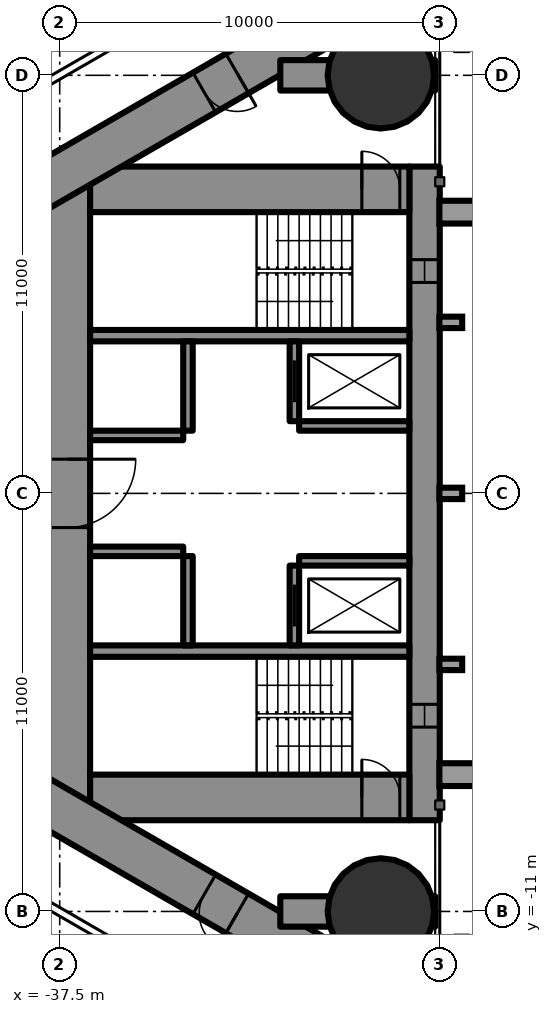
"""IFC4 building model, lengths in metres.
Left out: names, types, materials, properties, quantities, classifications, styles, units other than length and angle.
Written with IfcOpenShell. Run it as: python <this file> out.ifc"""

import sys

from ifc_helpers import new_model, si_unit, direction, frame, frame_2d, origin, origin_2d, place, context, subcontext, project, spatial, rectangle, circle, extrude, element, fill, save


model = new_model("IFC4")
c1 = context("Model", 3, precision=1e-05, world=origin(), true_north=direction((0.0, 1.0)))
c2 = subcontext(c1, "Body", "Model", "MODEL_VIEW")
j1 = project(units=[si_unit("LENGTHUNIT", "METRE"), si_unit("PLANEANGLEUNIT", "RADIAN")], contexts=[c1])
p1 = place(None, origin())
s1 = spatial("IfcSite", under=j1, at=p1, CompositionType="ELEMENT")
p2 = place(p1, origin())
s2 = spatial("IfcBuilding", under=s1, at=p2, CompositionType="ELEMENT")
p3 = place(p2, frame((0.0, 0.0, 201.8)))
s3 = spatial("IfcBuildingStorey", under=s2, at=p3, CompositionType="ELEMENT", Elevation=201.8)
for number, where, z_axis, x_axis in (
    (1, (-29.05, -11.0, 0.0), (0.0, 0.0, 1.0), (1.0, 0.0, 0.0)),
    (2, (-29.05, 11.0, 0.0), (0.0, 0.0, 1.0), (1.0, 0.0, 0.0)),
):
    element("IfcColumn", number, at=place(p3, frame(where, z_axis=z_axis, x_axis=x_axis)), inside=s3, PredefinedType="COLUMN", context=c2, shape_type="SweptSolid", body=[
        extrude(circle(Radius=1.4, at=origin_2d()), origin(), (0.0, 0.0, 1.0), 3.5),
    ])
p4 = place(p3, frame((-27.9, 8.6, 0.0), z_axis=(0.0, 0.0, 1.0), x_axis=(0.0, -1.0, 0.0)))
e3 = element("IfcWall", 3, at=p4, inside=s3, PredefinedType="SHEAR", context=c2, shape_type="SweptSolid", body=[
    extrude(rectangle(XDim=17.2, YDim=0.8, at=frame_2d((8.6, 0.0))), origin(), (0.0, 0.0, 1.0), 3.5),
])
p5 = place(p4, frame((2.45, 0.0, 0.6)))
e4 = element("IfcOpeningElement", 4, at=p5, cuts=e3, PredefinedType="OPENING", context=c2, shape_type="SweptSolid", body=[
    extrude(rectangle(XDim=0.6, YDim=2.1, at=frame_2d((0.3, 1.05))), frame((0.0, 0.41, 0.0), z_axis=(0.0, -1.0, 0.0), x_axis=(1.0, 0.0, 0.0)), (0.0, 0.0, 1.0), 0.82),
])
p6 = place(p4, frame((14.15, 0.0, 0.6)))
e5 = element("IfcOpeningElement", 5, at=p6, cuts=e3, PredefinedType="OPENING", context=c2, shape_type="SweptSolid", body=[
    extrude(rectangle(XDim=0.6, YDim=2.1, at=frame_2d((0.3, 1.05))), frame((0.0, 0.41, 0.0), z_axis=(0.0, -1.0, 0.0), x_axis=(1.0, 0.0, 0.0)), (0.0, 0.0, 1.0), 0.82),
])
p7 = place(p3, frame((-37.3, 8.6, 0.0), z_axis=(0.0, 0.0, 1.0), x_axis=(0.0, -1.0, 0.0)))
e6 = element("IfcWall", 6, at=p7, inside=s3, PredefinedType="SHEAR", context=c2, shape_type="SweptSolid", body=[
    extrude(rectangle(XDim=17.2, YDim=1.2, at=frame_2d((8.6, 0.0))), origin(), (0.0, 0.0, 1.0), 3.5),
])
p8 = place(p7, frame((7.7, 0.0, 0.0)))
e7 = element("IfcOpeningElement", 7, at=p8, cuts=e6, PredefinedType="OPENING", context=c2, shape_type="SweptSolid", body=[
    extrude(rectangle(XDim=1.8, YDim=2.2, at=frame_2d((0.9, 1.1))), frame((0.0, 0.61, 0.0), z_axis=(0.0, -1.0, 0.0), x_axis=(1.0, 0.0, 0.0)), (0.0, 0.0, 1.0), 1.22),
])
p9 = place(p3, frame((-28.3, 8.0, 0.0), z_axis=(0.0, 0.0, 1.0), x_axis=(-1.0, 0.0, 0.0)))
e8 = element("IfcWall", 8, at=p9, inside=s3, PredefinedType="SHEAR", context=c2, shape_type="SweptSolid", body=[
    extrude(rectangle(XDim=8.4, YDim=1.2, at=frame_2d((4.2, 0.0))), origin(), (0.0, 0.0, 1.0), 3.5),
])
p10 = place(p9, frame((0.25, 0.0, 0.0)))
e9 = element("IfcOpeningElement", 9, at=p10, cuts=e8, PredefinedType="OPENING", context=c2, shape_type="SweptSolid", body=[
    extrude(rectangle(XDim=1.0, YDim=2.2, at=frame_2d((0.5, 1.1))), frame((0.0, 0.61, 0.0), z_axis=(0.0, -1.0, 0.0), x_axis=(1.0, 0.0, 0.0)), (0.0, 0.0, 1.0), 1.22),
])
p11 = place(p3, frame((-28.3, -8.0, 0.0), z_axis=(0.0, 0.0, 1.0), x_axis=(-1.0, 0.0, 0.0)))
e10 = element("IfcWall", 10, at=p11, inside=s3, PredefinedType="SHEAR", context=c2, shape_type="SweptSolid", body=[
    extrude(rectangle(XDim=8.4, YDim=1.2, at=frame_2d((4.2, 0.0))), origin(), (0.0, 0.0, 1.0), 3.5),
])
p12 = place(p11, frame((0.25, 0.0, 0.0)))
e11 = element("IfcOpeningElement", 11, at=p12, cuts=e10, PredefinedType="OPENING", context=c2, shape_type="SweptSolid", body=[
    extrude(rectangle(XDim=1.0, YDim=2.2, at=frame_2d((0.5, 1.1))), frame((0.0, 0.61, 0.0), z_axis=(0.0, -1.0, 0.0), x_axis=(1.0, 0.0, 0.0)), (0.0, 0.0, 1.0), 1.22),
])
for number, where, z_axis, x_axis in (
    (12, (-28.3, 4.15, 0.0), (0.0, 0.0, 1.0), (-1.0, 0.0, 0.0)),
    (13, (-28.3, -4.15, 0.0), (0.0, 0.0, 1.0), (-1.0, 0.0, 0.0)),
):
    element("IfcWall", number, at=place(p3, frame(where, z_axis=z_axis, x_axis=x_axis)), inside=s3, PredefinedType="SHEAR", context=c2, shape_type="SweptSolid", body=[
        extrude(rectangle(XDim=8.4, YDim=0.3, at=frame_2d((4.2, 0.0))), origin(), (0.0, 0.0, 1.0), 3.5),
    ])
p13 = place(p3, frame((-31.325, 4.0, 0.0), z_axis=(0.0, 0.0, 1.0), x_axis=(0.0, -1.0, 0.0)))
e14 = element("IfcWall", 14, at=p13, inside=s3, PredefinedType="SHEAR", context=c2, shape_type="SweptSolid", body=[
    extrude(rectangle(XDim=2.1, YDim=0.25, at=frame_2d((1.05, 0.0))), origin(), (0.0, 0.0, 1.0), 3.5),
])
p14 = place(p13, frame((0.5, 0.0, 0.0)))
e15 = element("IfcOpeningElement", 15, at=p14, cuts=e14, PredefinedType="OPENING", context=c2, shape_type="SweptSolid", body=[
    extrude(rectangle(XDim=1.1, YDim=2.2, at=frame_2d((0.55, 1.1))), frame((0.0, 0.135, 0.0), z_axis=(0.0, -1.0, 0.0), x_axis=(1.0, 0.0, 0.0)), (0.0, 0.0, 1.0), 0.27),
])
p15 = place(p3, frame((-34.125, 4.0, 0.0), z_axis=(0.0, 0.0, 1.0), x_axis=(0.0, -1.0, 0.0)))
e16 = element("IfcWall", 16, at=p15, inside=s3, PredefinedType="SHEAR", context=c2, shape_type="SweptSolid", body=[
    extrude(rectangle(XDim=2.35, YDim=0.25, at=frame_2d((1.175, 0.0))), origin(), (0.0, 0.0, 1.0), 3.5),
])
p16 = place(p3, frame((-28.3, 1.775, 0.0), z_axis=(0.0, 0.0, 1.0), x_axis=(-1.0, 0.0, 0.0)))
e17 = element("IfcWall", 17, at=p16, inside=s3, PredefinedType="SHEAR", context=c2, shape_type="SweptSolid", body=[
    extrude(rectangle(XDim=2.9, YDim=0.25, at=frame_2d((1.45, 0.0))), origin(), (0.0, 0.0, 1.0), 3.5),
])
p17 = place(p3, frame((-34.25, 1.525, 0.0), z_axis=(0.0, 0.0, 1.0), x_axis=(-1.0, 0.0, 0.0)))
e18 = element("IfcWall", 18, at=p17, inside=s3, PredefinedType="SHEAR", context=c2, shape_type="SweptSolid", body=[
    extrude(rectangle(XDim=2.45, YDim=0.25, at=frame_2d((1.225, 0.0))), origin(), (0.0, 0.0, 1.0), 3.5),
])
p18 = place(p3, frame((-31.325, -1.9, 0.0), z_axis=(0.0, 0.0, 1.0), x_axis=(0.0, -1.0, 0.0)))
e19 = element("IfcWall", 19, at=p18, inside=s3, PredefinedType="SHEAR", context=c2, shape_type="SweptSolid", body=[
    extrude(rectangle(XDim=2.1, YDim=0.25, at=frame_2d((1.05, 0.0))), origin(), (0.0, 0.0, 1.0), 3.5),
])
p19 = place(p18, frame((0.5, 0.0, 0.0)))
e20 = element("IfcOpeningElement", 20, at=p19, cuts=e19, PredefinedType="OPENING", context=c2, shape_type="SweptSolid", body=[
    extrude(rectangle(XDim=1.1, YDim=2.2, at=frame_2d((0.55, 1.1))), frame((0.0, 0.135, 0.0), z_axis=(0.0, -1.0, 0.0), x_axis=(1.0, 0.0, 0.0)), (0.0, 0.0, 1.0), 0.27),
])
p20 = place(p3, frame((-34.125, -1.65, 0.0), z_axis=(0.0, 0.0, 1.0), x_axis=(0.0, -1.0, 0.0)))
e21 = element("IfcWall", 21, at=p20, inside=s3, PredefinedType="SHEAR", context=c2, shape_type="SweptSolid", body=[
    extrude(rectangle(XDim=2.35, YDim=0.25, at=frame_2d((1.175, 0.0))), origin(), (0.0, 0.0, 1.0), 3.5),
])
p21 = place(p3, frame((-28.3, -1.775, 0.0), z_axis=(0.0, 0.0, 1.0), x_axis=(-1.0, 0.0, 0.0)))
e22 = element("IfcWall", 22, at=p21, inside=s3, PredefinedType="SHEAR", context=c2, shape_type="SweptSolid", body=[
    extrude(rectangle(XDim=2.9, YDim=0.25, at=frame_2d((1.45, 0.0))), origin(), (0.0, 0.0, 1.0), 3.5),
])
p22 = place(p3, frame((-34.25, -1.525, 0.0), z_axis=(0.0, 0.0, 1.0), x_axis=(-1.0, 0.0, 0.0)))
e23 = element("IfcWall", 23, at=p22, inside=s3, PredefinedType="SHEAR", context=c2, shape_type="SweptSolid", body=[
    extrude(rectangle(XDim=2.45, YDim=0.25, at=frame_2d((1.225, 0.0))), origin(), (0.0, 0.0, 1.0), 3.5),
])
p23 = place(p3, frame((-27.2, 14.3, 0.0), z_axis=(0.0, 0.0, 1.0), x_axis=(-0.866026593062, -0.499997940104, 0.0)))
e24 = element("IfcWall", 24, at=p23, inside=s3, PredefinedType="SHEAR", context=c2, shape_type="SweptSolid", body=[
    extrude(rectangle(XDim=28.946, YDim=1.2, at=frame_2d((14.473, 0.0))), origin(), (0.0, 0.0, 1.0), 3.5),
])
p24 = place(p23, frame((6.5, 0.0, 0.0)))
e25 = element("IfcOpeningElement", 25, at=p24, cuts=e24, PredefinedType="OPENING", context=c2, shape_type="SweptSolid", body=[
    extrude(rectangle(XDim=1.0, YDim=2.2, at=frame_2d((0.5, 1.1))), frame((0.0, 0.61, 0.0), z_axis=(0.0, -1.0, 0.0), x_axis=(1.0, 0.0, 0.0)), (0.0, 0.0, 1.0), 1.22),
])
p25 = place(p23, frame((13.395, 0.0, 0.0)))
e26 = element("IfcOpeningElement", 26, at=p25, cuts=e24, PredefinedType="OPENING", context=c2, shape_type="SweptSolid", body=[
    extrude(rectangle(XDim=1.8, YDim=2.03, at=frame_2d((0.9, 1.015))), frame((0.0, 0.61, 0.0), z_axis=(0.0, -1.0, 0.0), x_axis=(1.0, 0.0, 0.0)), (0.0, 0.0, 1.0), 1.22),
])
p26 = place(p3, frame((-27.2, -14.3, 0.0), z_axis=(0.0, 0.0, 1.0), x_axis=(-0.866024021859, 0.500002393557, 0.0)))
e27 = element("IfcWall", 27, at=p26, inside=s3, PredefinedType="SHEAR", context=c2, shape_type="SweptSolid", body=[
    extrude(rectangle(XDim=27.907, YDim=1.2, at=frame_2d((13.954, 0.0))), origin(), (0.0, 0.0, 1.0), 3.5),
])
p27 = place(p26, frame((6.5, 0.0, 0.0)))
e28 = element("IfcOpeningElement", 28, at=p27, cuts=e27, PredefinedType="OPENING", context=c2, shape_type="SweptSolid", body=[
    extrude(rectangle(XDim=1.0, YDim=2.2, at=frame_2d((0.5, 1.1))), frame((0.0, 0.61, 0.0), z_axis=(0.0, -1.0, 0.0), x_axis=(1.0, 0.0, 0.0)), (0.0, 0.0, 1.0), 1.22),
])
p28 = place(p26, frame((13.829, 0.0, 0.0)))
e29 = element("IfcOpeningElement", 29, at=p28, cuts=e27, PredefinedType="OPENING", context=c2, shape_type="SweptSolid", body=[
    extrude(rectangle(XDim=1.8, YDim=2.2, at=frame_2d((0.9, 1.1))), frame((0.0, 0.61, 0.0), z_axis=(0.0, -1.0, 0.0), x_axis=(1.0, 0.0, 0.0)), (0.0, 0.0, 1.0), 1.22),
])
for number, where, z_axis, x_axis in (
    (30, (-27.62, -11.0, 0.0), (0.0, 0.0, 1.0), (-1.0, 0.0, 0.0)),
    (31, (-27.62, 11.0, 0.0), (0.0, 0.0, 1.0), (-1.0, 0.0, 0.0)),
):
    element("IfcWall", number, at=place(p3, frame(where, z_axis=z_axis, x_axis=x_axis)), inside=s3, PredefinedType="SHEAR", context=c2, shape_type="SweptSolid", body=[
        extrude(rectangle(XDim=4.076, YDim=0.8, at=frame_2d((2.038, 0.0))), origin(), (0.0, 0.0, 1.0), 3.5),
    ])
p29 = place(p3, frame((-27.803, 16.608, 0.0), z_axis=(0.0, 0.0, 1.0), x_axis=(-0.866025851808, -0.499999223999, 0.0)))
e32 = element("IfcWall", 32, at=p29, inside=s3, PredefinedType="PARTITIONING", context=c2, shape_type="SweptSolid", body=[
    extrude(rectangle(XDim=33.215, YDim=0.2, at=frame_2d((16.608, 0.0))), origin(), (0.0, 0.0, 1.0), 3.25),
])
p30 = place(p29, frame((5.584, 0.0, 0.0)))
e33 = element("IfcOpeningElement", 33, at=p30, cuts=e32, PredefinedType="OPENING", context=c2, shape_type="SweptSolid", body=[
    extrude(rectangle(XDim=2.0, YDim=2.4, at=frame_2d((1.0, 1.2))), frame((0.0, 0.11, 0.0), z_axis=(0.0, -1.0, 0.0), x_axis=(1.0, 0.0, 0.0)), (0.0, 0.0, 1.0), 0.22),
])
p31 = place(p29, frame((17.04, 0.0, 0.0)))
e34 = element("IfcOpeningElement", 34, at=p31, cuts=e32, PredefinedType="OPENING", context=c2, shape_type="SweptSolid", body=[
    extrude(rectangle(XDim=2.0, YDim=2.4, at=frame_2d((1.0, 1.2))), frame((0.0, 0.11, 0.0), z_axis=(0.0, -1.0, 0.0), x_axis=(1.0, 0.0, 0.0)), (0.0, 0.0, 1.0), 0.22),
])
p32 = place(p29, frame((24.735, 0.0, 0.0)))
e35 = element("IfcOpeningElement", 35, at=p32, cuts=e32, PredefinedType="OPENING", context=c2, shape_type="SweptSolid", body=[
    extrude(rectangle(XDim=2.0, YDim=2.4, at=frame_2d((1.0, 1.2))), frame((0.0, 0.11, 0.0), z_axis=(0.0, -1.0, 0.0), x_axis=(1.0, 0.0, 0.0)), (0.0, 0.0, 1.0), 0.22),
])
p33 = place(p29, frame((30.361, 0.0, 0.0)))
e36 = element("IfcOpeningElement", 36, at=p33, cuts=e32, PredefinedType="OPENING", context=c2, shape_type="SweptSolid", body=[
    extrude(rectangle(XDim=2.0, YDim=2.03, at=frame_2d((1.0, 1.015))), frame((0.0, 0.11, 0.0), z_axis=(0.0, -1.0, 0.0), x_axis=(1.0, 0.0, 0.0)), (0.0, 0.0, 1.0), 0.22),
])
p34 = place(p3, frame((-27.803, -16.608, 0.0), z_axis=(0.0, 0.0, 1.0), x_axis=(-0.866028577512, 0.499994502903, 0.0)))
e37 = element("IfcWall", 37, at=p34, inside=s3, PredefinedType="PARTITIONING", context=c2, shape_type="SweptSolid", body=[
    extrude(rectangle(XDim=12.688, YDim=0.2, at=frame_2d((6.344, 0.0))), origin(), (0.0, 0.0, 1.0), 3.25),
])
p35 = place(p34, frame((5.194, 0.0, 0.0)))
e38 = element("IfcOpeningElement", 38, at=p35, cuts=e37, PredefinedType="OPENING", context=c2, shape_type="SweptSolid", body=[
    extrude(rectangle(XDim=2.0, YDim=2.4, at=frame_2d((1.0, 1.2))), frame((0.0, 0.11, 0.0), z_axis=(0.0, -1.0, 0.0), x_axis=(1.0, 0.0, 0.0)), (0.0, 0.0, 1.0), 0.22),
])
p36 = place(p24, origin())
e39 = element("IfcDoor", 39, at=p36, inside=s3, OperationType="SINGLE_SWING_LEFT", PredefinedType="DOOR", context=c2, shape_type="SweptSolid", body=[
    extrude(rectangle(XDim=1.0, YDim=2.2, at=frame_2d((0.5, 1.1))), frame((0.0, 0.025, 0.0), z_axis=(0.0, -1.0, 0.0), x_axis=(1.0, 0.0, 0.0)), (0.0, 0.0, 1.0), 0.05),
])
fill(e25, e39)
p37 = place(p27, origin())
e40 = element("IfcDoor", 40, at=p37, inside=s3, OperationType="SINGLE_SWING_LEFT", PredefinedType="DOOR", context=c2, shape_type="SweptSolid", body=[
    extrude(rectangle(XDim=1.0, YDim=2.2, at=frame_2d((0.5, 1.1))), frame((0.0, 0.025, 0.0), z_axis=(0.0, -1.0, 0.0), x_axis=(1.0, 0.0, 0.0)), (0.0, 0.0, 1.0), 0.05),
])
fill(e28, e40)
p38 = place(p8, origin())
e41 = element("IfcDoor", 41, at=p38, inside=s3, OperationType="DOUBLE_DOOR_SINGLE_SWING", PredefinedType="DOOR", context=c2, shape_type="SweptSolid", body=[
    extrude(rectangle(XDim=1.8, YDim=2.2, at=frame_2d((0.9, 1.1))), frame((0.0, 0.025, 0.0), z_axis=(0.0, -1.0, 0.0), x_axis=(1.0, 0.0, 0.0)), (0.0, 0.0, 1.0), 0.05),
])
fill(e7, e41)
p39 = place(p10, origin())
e42 = element("IfcDoor", 42, at=p39, inside=s3, OperationType="SINGLE_SWING_RIGHT", PredefinedType="DOOR", context=c2, shape_type="SweptSolid", body=[
    extrude(rectangle(XDim=1.0, YDim=2.2, at=frame_2d((0.5, 1.1))), frame((0.0, 0.025, 0.0), z_axis=(0.0, -1.0, 0.0), x_axis=(1.0, 0.0, 0.0)), (0.0, 0.0, 1.0), 0.05),
])
fill(e9, e42)
p40 = place(p12, origin())
e43 = element("IfcDoor", 43, at=p40, inside=s3, OperationType="SINGLE_SWING_RIGHT", PredefinedType="DOOR", context=c2, shape_type="SweptSolid", body=[
    extrude(rectangle(XDim=1.0, YDim=2.2, at=frame_2d((0.5, 1.1))), frame((0.0, 0.025, 0.0), z_axis=(0.0, -1.0, 0.0), x_axis=(1.0, 0.0, 0.0)), (0.0, 0.0, 1.0), 0.05),
])
fill(e11, e43)
p41 = place(p14, origin())
e44 = element("IfcDoor", 44, at=p41, inside=s3, OperationType="SLIDING_TO_LEFT", PredefinedType="USERDEFINED", context=c2, shape_type="SweptSolid", body=[
    extrude(rectangle(XDim=1.1, YDim=2.2, at=frame_2d((0.55, 1.1))), frame((0.0, 0.025, 0.0), z_axis=(0.0, -1.0, 0.0), x_axis=(1.0, 0.0, 0.0)), (0.0, 0.0, 1.0), 0.05),
])
fill(e15, e44)
p42 = place(p19, origin())
e45 = element("IfcDoor", 45, at=p42, inside=s3, OperationType="SLIDING_TO_LEFT", PredefinedType="USERDEFINED", context=c2, shape_type="SweptSolid", body=[
    extrude(rectangle(XDim=1.1, YDim=2.2, at=frame_2d((0.55, 1.1))), frame((0.0, 0.025, 0.0), z_axis=(0.0, -1.0, 0.0), x_axis=(1.0, 0.0, 0.0)), (0.0, 0.0, 1.0), 0.05),
])
fill(e20, e45)
p43 = place(p5, origin())
e46 = element("IfcWindow", 46, at=p43, inside=s3, PartitioningType="SINGLE_PANEL", PredefinedType="WINDOW", context=c2, shape_type="SweptSolid", body=[
    extrude(rectangle(XDim=0.6, YDim=2.1, at=frame_2d((0.3, 1.05))), frame((0.0, 0.03, 0.0), z_axis=(0.0, -1.0, 0.0), x_axis=(1.0, 0.0, 0.0)), (0.0, 0.0, 1.0), 0.06),
])
fill(e4, e46)
p44 = place(p6, origin())
e47 = element("IfcWindow", 47, at=p44, inside=s3, PartitioningType="SINGLE_PANEL", PredefinedType="WINDOW", context=c2, shape_type="SweptSolid", body=[
    extrude(rectangle(XDim=0.6, YDim=2.1, at=frame_2d((0.3, 1.05))), frame((0.0, 0.03, 0.0), z_axis=(0.0, -1.0, 0.0), x_axis=(1.0, 0.0, 0.0)), (0.0, 0.0, 1.0), 0.06),
])
fill(e5, e47)
save(model, sys.argv[1])
